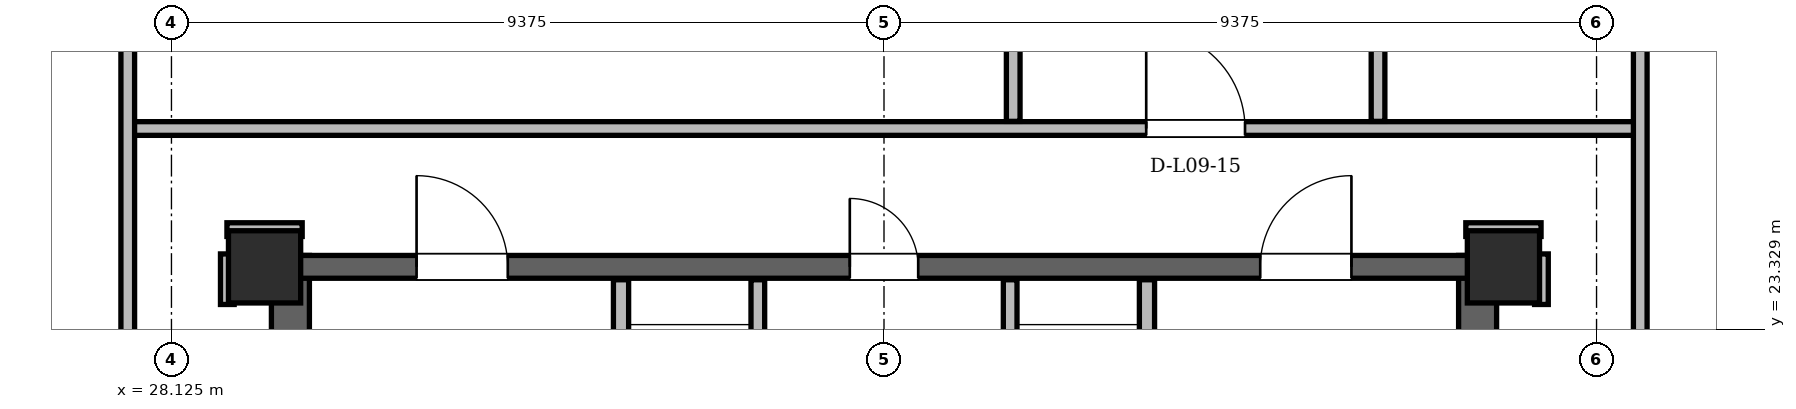
"""IFC4 building model, lengths in metres.
Left out: names, types, materials, properties, quantities, classifications, styles, units other than length and angle.
Written with IfcOpenShell. Run it as: python <this file> out.ifc"""

import sys

from ifc_helpers import new_model, si_unit, direction, frame, frame_2d, origin, origin_2d, place, context, subcontext, project, spatial, rectangle, hollow_rectangle, extrude, element, fill, save


model = new_model("IFC4")
c1 = context("Model", 3, precision=1e-05, world=origin(), true_north=direction((0.0, 1.0)))
c2 = subcontext(c1, "Body", "Model", "MODEL_VIEW")
j1 = project(units=[si_unit("LENGTHUNIT", "METRE"), si_unit("PLANEANGLEUNIT", "RADIAN")], contexts=[c1])
p1 = place(None, origin())
s1 = spatial("IfcSite", under=j1, at=p1, CompositionType="ELEMENT")
p2 = place(p1, origin())
s2 = spatial("IfcBuilding", under=s1, at=p2, CompositionType="ELEMENT")
p3 = place(p2, frame((0.0, 0.0, 38.1)))
s3 = spatial("IfcBuildingStorey", under=s2, at=p3, CompositionType="ELEMENT", Elevation=38.1)
for number, where, z_axis, x_axis in (
    (1, (45.65, 24.15, 0.0), (0.0, 0.0, 1.0), (1.0, 0.0, 0.0)),
    (2, (29.35, 24.15, 0.0), (0.0, 0.0, 1.0), (1.0, 0.0, 0.0)),
):
    element("IfcColumn", number, at=place(p3, frame(where, z_axis=z_axis, x_axis=x_axis)), inside=s3, PredefinedType="COLUMN", context=c2, shape_type="SweptSolid", body=[
        extrude(hollow_rectangle(XDim=0.95, YDim=0.95, WallThickness=0.08, at=origin_2d()), origin(), (0.0, 0.0, 1.0), 3.6),
    ])
for number, where, z_axis, x_axis in (
    (3, (29.69, 11.0, 0.0), (0.0, 0.0, 1.0), (0.0, 1.0, 0.0)),
    (4, (45.31, 11.0, 0.0), (0.0, 0.0, 1.0), (0.0, 1.0, 0.0)),
):
    element("IfcWall", number, at=place(p3, frame(where, z_axis=z_axis, x_axis=x_axis)), inside=s3, PredefinedType="SHEAR", context=c2, shape_type="SweptSolid", body=[
        extrude(rectangle(XDim=13.3, YDim=0.5, at=frame_2d((6.65, 0.0))), origin(), (0.0, 0.0, 1.0), 3.36),
    ])
p4 = place(p3, frame((29.65, 24.15, 0.0), z_axis=(0.0, 0.0, 1.0), x_axis=(1.0, 0.0, 0.0)))
e5 = element("IfcWall", 5, at=p4, inside=s3, PredefinedType="SHEAR", context=c2, shape_type="SweptSolid", body=[
    extrude(rectangle(XDim=15.7, YDim=0.3, at=frame_2d((7.85, 0.0))), origin(), (0.0, 0.0, 1.0), 3.36),
])
p5 = place(p4, frame((1.7, 0.0, 0.0)))
e6 = element("IfcOpeningElement", 6, at=p5, cuts=e5, PredefinedType="OPENING", context=c2, shape_type="SweptSolid", body=[
    extrude(rectangle(XDim=1.2, YDim=2.2, at=frame_2d((0.6, 1.1))), frame((0.0, 0.15, 0.0), z_axis=(0.0, -1.0, 0.0), x_axis=(1.0, 0.0, 0.0)), (0.0, 0.0, 1.0), 0.3),
])
p6 = place(p4, frame((12.8, 0.0, 0.0)))
e7 = element("IfcOpeningElement", 7, at=p6, cuts=e5, PredefinedType="OPENING", context=c2, shape_type="SweptSolid", body=[
    extrude(rectangle(XDim=1.2, YDim=2.2, at=frame_2d((0.6, 1.1))), frame((0.0, 0.15, 0.0), z_axis=(0.0, -1.0, 0.0), x_axis=(1.0, 0.0, 0.0)), (0.0, 0.0, 1.0), 0.3),
])
p7 = place(p4, frame((7.4, 0.0, 0.0)))
e8 = element("IfcOpeningElement", 8, at=p7, cuts=e5, PredefinedType="OPENING", context=c2, shape_type="SweptSolid", body=[
    extrude(rectangle(XDim=0.9, YDim=2.05, at=frame_2d((0.45, 1.025))), frame((0.0, 0.15, 0.0), z_axis=(0.0, -1.0, 0.0), x_axis=(1.0, 0.0, 0.0)), (0.0, 0.0, 1.0), 0.3),
])
p8 = place(p3, frame((61.713, 15.014, 0.0), z_axis=(0.0, 0.0, 1.0), x_axis=(-0.499997221217, 0.86602700811, 0.0)))
e9 = element("IfcWall", 9, at=p8, inside=s3, PredefinedType="SOLIDWALL", context=c2, shape_type="SweptSolid", body=[
    extrude(rectangle(XDim=33.022, YDim=0.34, at=frame_2d((16.511, 0.0))), origin(), (0.0, 0.0, 1.0), 2.494),
])
p9 = place(p8, frame((7.404, 0.0, 0.0)))
e10 = element("IfcOpeningElement", 10, at=p9, cuts=e9, PredefinedType="OPENING", context=c2, shape_type="SweptSolid", body=[
    extrude(rectangle(XDim=1.5, YDim=2.2, at=frame_2d((0.75, 1.1))), frame((0.0, 0.17, 0.0), z_axis=(0.0, -1.0, 0.0), x_axis=(1.0, 0.0, 0.0)), (0.0, 0.0, 1.0), 0.34),
])
p10 = place(p8, frame((25.362, 0.0, 0.0)))
e11 = element("IfcOpeningElement", 11, at=p10, cuts=e9, PredefinedType="OPENING", context=c2, shape_type="SweptSolid", body=[
    extrude(rectangle(XDim=1.5, YDim=2.2, at=frame_2d((0.75, 1.1))), frame((0.0, 0.17, 0.0), z_axis=(0.0, -1.0, 0.0), x_axis=(1.0, 0.0, 0.0)), (0.0, 0.0, 1.0), 0.34),
])
p11 = place(p8, frame((1.657, 0.0, 0.85)))
e12 = element("IfcOpeningElement", 12, at=p11, cuts=e9, PredefinedType="OPENING", context=c2, shape_type="SweptSolid", body=[
    extrude(rectangle(XDim=1.2, YDim=1.48, at=frame_2d((0.6, 0.74))), frame((0.0, 0.17, 0.0), z_axis=(0.0, -1.0, 0.0), x_axis=(1.0, 0.0, 0.0)), (0.0, 0.0, 1.0), 0.34),
])
p12 = place(p8, frame((17.282, 0.0, 0.85)))
e13 = element("IfcOpeningElement", 13, at=p12, cuts=e9, PredefinedType="OPENING", context=c2, shape_type="SweptSolid", body=[
    extrude(rectangle(XDim=2.5, YDim=1.534, at=frame_2d((1.25, 0.767))), frame((0.0, 0.17, 0.0), z_axis=(0.0, -1.0, 0.0), x_axis=(1.0, 0.0, 0.0)), (0.0, 0.0, 1.0), 0.34),
])
p13 = place(p8, frame((10.692, 0.0, 0.85)))
e14 = element("IfcOpeningElement", 14, at=p13, cuts=e9, PredefinedType="OPENING", context=c2, shape_type="SweptSolid", body=[
    extrude(rectangle(XDim=1.2, YDim=1.48, at=frame_2d((0.6, 0.74))), frame((0.0, 0.17, 0.0), z_axis=(0.0, -1.0, 0.0), x_axis=(1.0, 0.0, 0.0)), (0.0, 0.0, 1.0), 0.34),
])
p14 = place(p8, frame((13.576, 0.0, 0.85)))
e15 = element("IfcOpeningElement", 15, at=p14, cuts=e9, PredefinedType="OPENING", context=c2, shape_type="SweptSolid", body=[
    extrude(rectangle(XDim=1.2, YDim=1.48, at=frame_2d((0.6, 0.74))), frame((0.0, 0.17, 0.0), z_axis=(0.0, -1.0, 0.0), x_axis=(1.0, 0.0, 0.0)), (0.0, 0.0, 1.0), 0.34),
])
p15 = place(p3, frame((29.798, 43.612, 0.0), z_axis=(0.0, 0.0, 1.0), x_axis=(-0.499997221217, -0.86602700811, 0.0)))
e16 = element("IfcWall", 16, at=p15, inside=s3, PredefinedType="SOLIDWALL", context=c2, shape_type="SweptSolid", body=[
    extrude(rectangle(XDim=33.022, YDim=0.34, at=frame_2d((16.511, 0.0))), origin(), (0.0, 0.0, 1.0), 2.494),
])
p16 = place(p15, frame((7.404, 0.0, 0.0)))
e17 = element("IfcOpeningElement", 17, at=p16, cuts=e16, PredefinedType="OPENING", context=c2, shape_type="SweptSolid", body=[
    extrude(rectangle(XDim=1.5, YDim=2.2, at=frame_2d((0.75, 1.1))), frame((0.0, 0.17, 0.0), z_axis=(0.0, -1.0, 0.0), x_axis=(1.0, 0.0, 0.0)), (0.0, 0.0, 1.0), 0.34),
])
p17 = place(p15, frame((25.362, 0.0, 0.0)))
e18 = element("IfcOpeningElement", 18, at=p17, cuts=e16, PredefinedType="OPENING", context=c2, shape_type="SweptSolid", body=[
    extrude(rectangle(XDim=1.5, YDim=2.2, at=frame_2d((0.75, 1.1))), frame((0.0, 0.17, 0.0), z_axis=(0.0, -1.0, 0.0), x_axis=(1.0, 0.0, 0.0)), (0.0, 0.0, 1.0), 0.34),
])
p18 = place(p15, frame((15.315, 0.0, 0.85)))
e19 = element("IfcOpeningElement", 19, at=p18, cuts=e16, PredefinedType="OPENING", context=c2, shape_type="SweptSolid", body=[
    extrude(rectangle(XDim=2.0, YDim=1.534, at=frame_2d((1.0, 0.767))), frame((0.0, 0.17, 0.0), z_axis=(0.0, -1.0, 0.0), x_axis=(1.0, 0.0, 0.0)), (0.0, 0.0, 1.0), 0.34),
])
p19 = place(p15, frame((28.879, 0.0, 0.85)))
e20 = element("IfcOpeningElement", 20, at=p19, cuts=e16, PredefinedType="OPENING", context=c2, shape_type="SweptSolid", body=[
    extrude(rectangle(XDim=1.4, YDim=1.534, at=frame_2d((0.7, 0.767))), frame((0.0, 0.17, 0.0), z_axis=(0.0, -1.0, 0.0), x_axis=(1.0, 0.0, 0.0)), (0.0, 0.0, 1.0), 0.34),
])
p20 = place(p15, frame((10.808, 0.0, 0.85)))
e21 = element("IfcOpeningElement", 21, at=p20, cuts=e16, PredefinedType="OPENING", context=c2, shape_type="SweptSolid", body=[
    extrude(rectangle(XDim=1.2, YDim=1.48, at=frame_2d((0.6, 0.74))), frame((0.0, 0.17, 0.0), z_axis=(0.0, -1.0, 0.0), x_axis=(1.0, 0.0, 0.0)), (0.0, 0.0, 1.0), 0.34),
])
p21 = place(p3, frame((34.04, 19.48, 0.0), z_axis=(0.0, 0.0, 1.0), x_axis=(0.0, 1.0, 0.0)))
e22 = element("IfcWall", 22, at=p21, inside=s3, PredefinedType="PARTITIONING", context=c2, shape_type="SweptSolid", body=[
    extrude(rectangle(XDim=4.5, YDim=0.2, at=frame_2d((2.25, 0.0))), origin(), (0.0, 0.0, 1.0), 2.4),
])
p22 = place(p21, frame((2.12, 0.0, 0.0)))
e23 = element("IfcOpeningElement", 23, at=p22, cuts=e22, PredefinedType="OPENING", context=c2, shape_type="SweptSolid", body=[
    extrude(rectangle(XDim=1.1, YDim=2.2, at=frame_2d((0.55, 1.1))), frame((0.0, 0.1, 0.0), z_axis=(0.0, -1.0, 0.0), x_axis=(1.0, 0.0, 0.0)), (0.0, 0.0, 1.0), 0.2),
])
p23 = place(p3, frame((35.84, 20.96, 0.0), z_axis=(0.0, 0.0, 1.0), x_axis=(0.0, 1.0, 0.0)))
e24 = element("IfcWall", 24, at=p23, inside=s3, PredefinedType="PARTITIONING", context=c2, shape_type="SweptSolid", body=[
    extrude(rectangle(XDim=3.02, YDim=0.18, at=frame_2d((1.51, 0.0))), origin(), (0.0, 0.0, 1.0), 2.4),
])
p24 = place(p3, frame((40.96, 19.48, 0.0), z_axis=(0.0, 0.0, 1.0), x_axis=(0.0, 1.0, 0.0)))
e25 = element("IfcWall", 25, at=p24, inside=s3, PredefinedType="PARTITIONING", context=c2, shape_type="SweptSolid", body=[
    extrude(rectangle(XDim=4.5, YDim=0.2, at=frame_2d((2.25, 0.0))), origin(), (0.0, 0.0, 1.0), 2.4),
])
p25 = place(p24, frame((2.12, 0.0, 0.0)))
e26 = element("IfcOpeningElement", 26, at=p25, cuts=e25, PredefinedType="OPENING", context=c2, shape_type="SweptSolid", body=[
    extrude(rectangle(XDim=1.1, YDim=2.2, at=frame_2d((0.55, 1.1))), frame((0.0, 0.1, 0.0), z_axis=(0.0, -1.0, 0.0), x_axis=(1.0, 0.0, 0.0)), (0.0, 0.0, 1.0), 0.2),
])
p26 = place(p3, frame((39.16, 20.96, 0.0), z_axis=(0.0, 0.0, 1.0), x_axis=(0.0, 1.0, 0.0)))
e27 = element("IfcWall", 27, at=p26, inside=s3, PredefinedType="PARTITIONING", context=c2, shape_type="SweptSolid", body=[
    extrude(rectangle(XDim=3.02, YDim=0.18, at=frame_2d((1.51, 0.0))), origin(), (0.0, 0.0, 1.0), 2.4),
])
for number, where, z_axis, x_axis in (
    (28, (28.855, 24.64, 0.0), (0.0, 0.0, 1.0), (1.0, 0.0, 0.0)),
    (29, (45.155, 24.64, 0.0), (0.0, 0.0, 1.0), (1.0, 0.0, 0.0)),
):
    element("IfcWall", number, at=place(p3, frame(where, z_axis=z_axis, x_axis=x_axis)), inside=s3, PredefinedType="PARTITIONING", context=c2, shape_type="SweptSolid", body=[
        extrude(rectangle(XDim=0.99, YDim=0.18, at=frame_2d((0.495, 0.0))), origin(), (0.0, 0.0, 1.0), 2.738),
    ])
p27 = place(p3, frame((27.55, 25.97, 0.0), z_axis=(0.0, 0.0, 1.0), x_axis=(1.0, 0.0, 0.0)))
e30 = element("IfcWall", 30, at=p27, inside=s3, PredefinedType="PARTITIONING", context=c2, shape_type="SweptSolid", body=[
    extrude(rectangle(XDim=19.9, YDim=0.18, at=frame_2d((9.95, 0.0))), origin(), (0.0, 0.0, 1.0), 2.738),
])
p28 = place(p27, frame((13.4, 0.0, 0.0)))
e31 = element("IfcOpeningElement", 31, at=p28, cuts=e30, PredefinedType="OPENING", context=c2, shape_type="SweptSolid", body=[
    extrude(rectangle(XDim=1.3, YDim=2.2, at=frame_2d((0.65, 1.1))), frame((0.0, 0.09, 0.0), z_axis=(0.0, -1.0, 0.0), x_axis=(1.0, 0.0, 0.0)), (0.0, 0.0, 1.0), 0.18),
])
p29 = place(p3, frame((27.55, 11.044, 0.0), z_axis=(0.0, 0.0, 1.0), x_axis=(0.0, 1.0, 0.0)))
e32 = element("IfcWall", 32, at=p29, inside=s3, PredefinedType="PARTITIONING", context=c2, shape_type="SweptSolid", body=[
    extrude(rectangle(XDim=28.326, YDim=0.18, at=frame_2d((14.163, 0.0))), origin(), (0.0, 0.0, 1.0), 2.494),
])
p30 = place(p29, frame((8.121, 0.0, 0.0)))
e33 = element("IfcOpeningElement", 33, at=p30, cuts=e32, PredefinedType="OPENING", context=c2, shape_type="SweptSolid", body=[
    extrude(rectangle(XDim=1.0, YDim=2.18, at=frame_2d((0.5, 1.09))), frame((0.0, 0.09, 0.0), z_axis=(0.0, -1.0, 0.0), x_axis=(1.0, 0.0, 0.0)), (0.0, 0.0, 1.0), 0.18),
])
p31 = place(p3, frame((28.86, 23.655, 0.0), z_axis=(0.0, 0.0, 1.0), x_axis=(0.0, 1.0, 0.0)))
e34 = element("IfcWall", 34, at=p31, inside=s3, PredefinedType="PARTITIONING", context=c2, shape_type="SweptSolid", body=[
    extrude(rectangle(XDim=0.665, YDim=0.18, at=frame_2d((0.333, 0.0))), origin(), (0.0, 0.0, 1.0), 3.36),
])
p32 = place(p3, frame((39.2, 26.064, 0.0), z_axis=(0.0, 0.0, 1.0), x_axis=(0.0, 1.0, 0.0)))
e35 = element("IfcWall", 35, at=p32, inside=s3, PredefinedType="PARTITIONING", context=c2, shape_type="SweptSolid", body=[
    extrude(rectangle(XDim=4.312, YDim=0.18, at=frame_2d((2.156, 0.0))), origin(), (0.0, 0.0, 1.0), 3.36),
])
p33 = place(p3, frame((44.0, 26.064, 0.0), z_axis=(0.0, 0.0, 1.0), x_axis=(0.0, 1.0, 0.0)))
e36 = element("IfcWall", 36, at=p33, inside=s3, PredefinedType="PARTITIONING", context=c2, shape_type="SweptSolid", body=[
    extrude(rectangle(XDim=4.312, YDim=0.18, at=frame_2d((2.156, 0.0))), origin(), (0.0, 0.0, 1.0), 2.946),
])
p34 = place(p3, frame((46.15, 23.655, 0.0), z_axis=(0.0, 0.0, 1.0), x_axis=(0.0, 1.0, 0.0)))
e37 = element("IfcWall", 37, at=p34, inside=s3, PredefinedType="PARTITIONING", context=c2, shape_type="SweptSolid", body=[
    extrude(rectangle(XDim=0.665, YDim=0.18, at=frame_2d((0.333, 0.0))), origin(), (0.0, 0.0, 1.0), 3.36),
])
p35 = place(p3, frame((47.45, 11.044, 0.0), z_axis=(0.0, 0.0, 1.0), x_axis=(0.0, 1.0, 0.0)))
e38 = element("IfcWall", 38, at=p35, inside=s3, PredefinedType="PARTITIONING", context=c2, shape_type="SweptSolid", body=[
    extrude(rectangle(XDim=28.326, YDim=0.18, at=frame_2d((14.163, 0.0))), origin(), (0.0, 0.0, 1.0), 2.494),
])
p36 = place(p35, frame((10.822, 0.0, 0.0)))
e39 = element("IfcOpeningElement", 39, at=p36, cuts=e38, PredefinedType="OPENING", context=c2, shape_type="SweptSolid", body=[
    extrude(rectangle(XDim=1.0, YDim=2.18, at=frame_2d((0.5, 1.09))), frame((0.0, 0.09, 0.0), z_axis=(0.0, -1.0, 0.0), x_axis=(1.0, 0.0, 0.0)), (0.0, 0.0, 1.0), 0.18),
])
p37 = place(p5, origin())
e40 = element("IfcDoor", 40, at=p37, inside=s3, OperationType="SINGLE_SWING_LEFT", PredefinedType="DOOR", context=c2, shape_type="SweptSolid", body=[
    extrude(rectangle(XDim=1.2, YDim=2.2, at=frame_2d((0.6, 1.1))), frame((0.0, 0.025, 0.0), z_axis=(0.0, -1.0, 0.0), x_axis=(1.0, 0.0, 0.0)), (0.0, 0.0, 1.0), 0.05),
])
fill(e6, e40)
p38 = place(p6, origin())
e41 = element("IfcDoor", 41, at=p38, inside=s3, OperationType="SINGLE_SWING_RIGHT", PredefinedType="DOOR", context=c2, shape_type="SweptSolid", body=[
    extrude(rectangle(XDim=1.2, YDim=2.2, at=frame_2d((0.6, 1.1))), frame((0.0, 0.025, 0.0), z_axis=(0.0, -1.0, 0.0), x_axis=(1.0, 0.0, 0.0)), (0.0, 0.0, 1.0), 0.05),
])
fill(e7, e41)
p39 = place(p7, origin())
e42 = element("IfcDoor", 42, at=p39, inside=s3, OperationType="SINGLE_SWING_LEFT", PredefinedType="DOOR", context=c2, shape_type="SweptSolid", body=[
    extrude(rectangle(XDim=0.9, YDim=2.05, at=frame_2d((0.45, 1.025))), frame((0.0, 0.025, 0.0), z_axis=(0.0, -1.0, 0.0), x_axis=(1.0, 0.0, 0.0)), (0.0, 0.0, 1.0), 0.05),
])
fill(e8, e42)
p40 = place(p28, origin())
e43 = element("IfcDoor", 43, at=p40, inside=s3, OperationType="SINGLE_SWING_LEFT", PredefinedType="DOOR", context=c2, shape_type="SweptSolid", body=[
    extrude(rectangle(XDim=1.3, YDim=2.2, at=frame_2d((0.65, 1.1))), frame((0.0, 0.025, 0.0), z_axis=(0.0, -1.0, 0.0), x_axis=(1.0, 0.0, 0.0)), (0.0, 0.0, 1.0), 0.05),
])
fill(e31, e43)
save(model, sys.argv[1])
